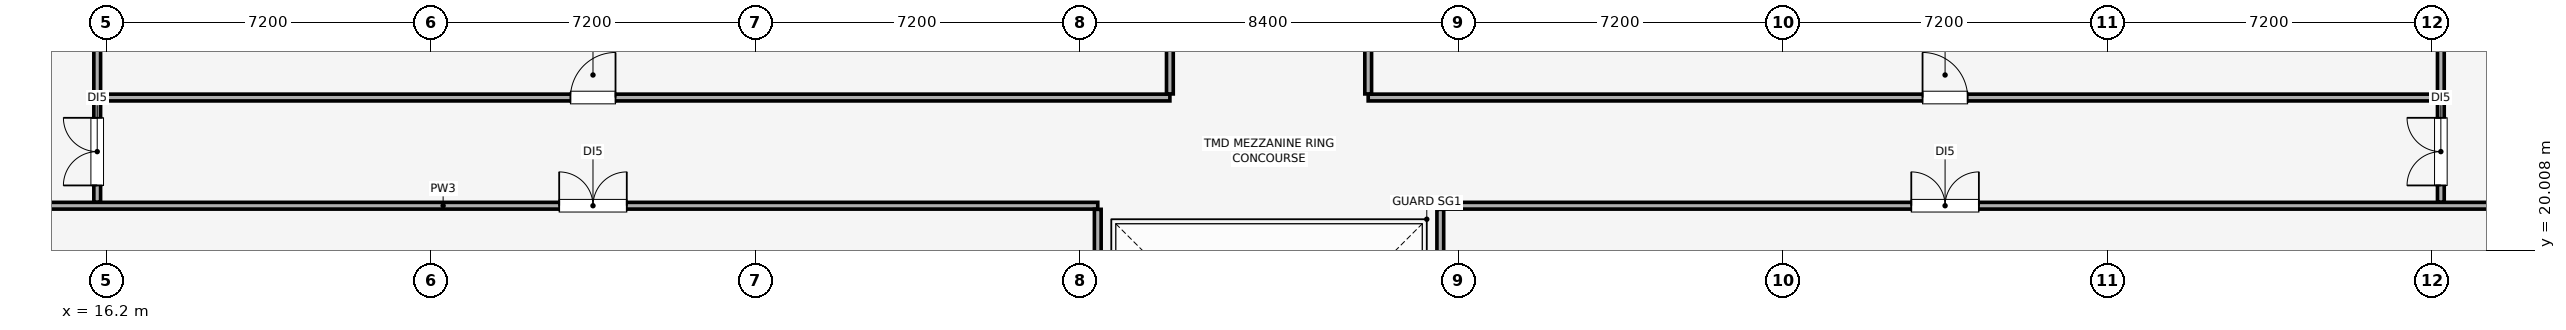
"""IFC4 building model, lengths in metres.
Left out: names, types, materials, properties, quantities, classifications, styles, units other than length and angle.
Written with IfcOpenShell. Run it as: python <this file> out.ifc"""

import sys

from ifc_helpers import new_model, si_unit, direction, frame, frame_2d, origin, place, context, subcontext, project, spatial, rectangle, extrude, element, fill, save


model = new_model("IFC4")
c1 = context("Model", 3, precision=1e-05, world=origin(), true_north=direction((0.0, 1.0)))
c2 = subcontext(c1, "Body", "Model", "MODEL_VIEW")
j1 = project(units=[si_unit("LENGTHUNIT", "METRE"), si_unit("PLANEANGLEUNIT", "RADIAN")], contexts=[c1])
p1 = place(None, origin())
s1 = spatial("IfcSite", under=j1, at=p1, CompositionType="ELEMENT")
p2 = place(p1, origin())
s2 = spatial("IfcBuilding", under=s1, at=p2, CompositionType="ELEMENT")
p3 = place(p2, frame((0.0, 0.0, 300.2)))
s3 = spatial("IfcBuildingStorey", under=s2, at=p3, CompositionType="ELEMENT", Elevation=300.2)
p4 = place(p3, frame((9.15, 21.0, 0.0), z_axis=(0.0, 0.0, 1.0), x_axis=(1.0, 0.0, 0.0)))
e1 = element("IfcWall", 1, at=p4, inside=s3, PredefinedType="PARTITIONING", context=c2, shape_type="SweptSolid", body=[
    extrude(rectangle(XDim=29.05, YDim=0.15, at=frame_2d((14.525, 0.0))), origin(), (0.0, 0.0, 1.0), 5.12),
])
p5 = place(p4, frame((17.1, 0.0, 0.0)))
e2 = element("IfcOpeningElement", 2, at=p5, cuts=e1, PredefinedType="OPENING", context=c2, shape_type="SweptSolid", body=[
    extrude(rectangle(XDim=1.5, YDim=2.25, at=frame_2d((0.75, 1.125))), frame((0.0, 0.085, 0.0), z_axis=(0.0, -1.0, 0.0), x_axis=(1.0, 0.0, 0.0)), (0.0, 0.0, 1.0), 0.17),
])
p6 = place(p3, frame((38.2, 7.15, 0.0), z_axis=(0.0, 0.0, 1.0), x_axis=(0.0, 1.0, 0.0)))
e3 = element("IfcWall", 3, at=p6, inside=s3, PredefinedType="PARTITIONING", context=c2, shape_type="SweptSolid", body=[
    extrude(rectangle(XDim=13.77, YDim=0.15, at=frame_2d((6.885, 0.0))), origin(), (0.0, 0.0, 1.0), 5.12),
])
p7 = place(p3, frame((45.8, 21.0, 0.0), z_axis=(0.0, 0.0, 1.0), x_axis=(1.0, 0.0, 0.0)))
e4 = element("IfcWall", 4, at=p7, inside=s3, PredefinedType="PARTITIONING", context=c2, shape_type="SweptSolid", body=[
    extrude(rectangle(XDim=29.05, YDim=0.15, at=frame_2d((14.525, 0.0))), origin(), (0.0, 0.0, 1.0), 5.12),
])
p8 = place(p7, frame((10.45, 0.0, 0.0)))
e5 = element("IfcOpeningElement", 5, at=p8, cuts=e4, PredefinedType="OPENING", context=c2, shape_type="SweptSolid", body=[
    extrude(rectangle(XDim=1.5, YDim=2.25, at=frame_2d((0.75, 1.125))), frame((0.0, 0.085, 0.0), z_axis=(0.0, -1.0, 0.0), x_axis=(1.0, 0.0, 0.0)), (0.0, 0.0, 1.0), 0.17),
])
p9 = place(p3, frame((45.8, 7.15, 0.0), z_axis=(0.0, 0.0, 1.0), x_axis=(0.0, 1.0, 0.0)))
e6 = element("IfcWall", 6, at=p9, inside=s3, PredefinedType="PARTITIONING", context=c2, shape_type="SweptSolid", body=[
    extrude(rectangle(XDim=13.77, YDim=0.15, at=frame_2d((6.885, 0.0))), origin(), (0.0, 0.0, 1.0), 5.12),
])
p10 = place(p3, frame((16.0, 23.4, 0.0), z_axis=(0.0, 0.0, 1.0), x_axis=(1.0, 0.0, 0.0)))
e7 = element("IfcWall", 7, at=p10, inside=s3, PredefinedType="PARTITIONING", context=c2, shape_type="SweptSolid", body=[
    extrude(rectangle(XDim=23.8, YDim=0.15, at=frame_2d((11.9, 0.0))), origin(), (0.0, 0.0, 1.0), 5.12),
])
p11 = place(p10, frame((10.5, 0.0, 0.0)))
e8 = element("IfcOpeningElement", 8, at=p11, cuts=e7, PredefinedType="OPENING", context=c2, shape_type="SweptSolid", body=[
    extrude(rectangle(XDim=1.0, YDim=2.15, at=frame_2d((0.5, 1.075))), frame((0.0, 0.085, 0.0), z_axis=(0.0, -1.0, 0.0), x_axis=(1.0, 0.0, 0.0)), (0.0, 0.0, 1.0), 0.17),
])
p12 = place(p3, frame((16.0, 23.48, 0.0), z_axis=(0.0, 0.0, 1.0), x_axis=(0.0, 1.0, 0.0)))
e9 = element("IfcWall", 9, at=p12, inside=s3, PredefinedType="PARTITIONING", context=c2, shape_type="SweptSolid", body=[
    extrude(rectangle(XDim=5.91, YDim=0.15, at=frame_2d((2.955, 0.0))), origin(), (0.0, 0.0, 1.0), 4.76),
])
p13 = place(p3, frame((39.8, 23.48, 0.0), z_axis=(0.0, 0.0, 1.0), x_axis=(0.0, 1.0, 0.0)))
e10 = element("IfcWall", 10, at=p13, inside=s3, PredefinedType="PARTITIONING", context=c2, shape_type="SweptSolid", body=[
    extrude(rectangle(XDim=5.84, YDim=0.15, at=frame_2d((2.92, 0.0))), origin(), (0.0, 0.0, 1.0), 5.12),
])
p14 = place(p3, frame((44.2, 23.4, 0.0), z_axis=(0.0, 0.0, 1.0), x_axis=(1.0, 0.0, 0.0)))
e11 = element("IfcWall", 11, at=p14, inside=s3, PredefinedType="PARTITIONING", context=c2, shape_type="SweptSolid", body=[
    extrude(rectangle(XDim=23.8, YDim=0.15, at=frame_2d((11.9, 0.0))), origin(), (0.0, 0.0, 1.0), 5.12),
])
p15 = place(p14, frame((12.3, 0.0, 0.0)))
e12 = element("IfcOpeningElement", 12, at=p15, cuts=e11, PredefinedType="OPENING", context=c2, shape_type="SweptSolid", body=[
    extrude(rectangle(XDim=1.0, YDim=2.15, at=frame_2d((0.5, 1.075))), frame((0.0, 0.085, 0.0), z_axis=(0.0, -1.0, 0.0), x_axis=(1.0, 0.0, 0.0)), (0.0, 0.0, 1.0), 0.17),
])
p16 = place(p3, frame((44.2, 23.48, 0.0), z_axis=(0.0, 0.0, 1.0), x_axis=(0.0, 1.0, 0.0)))
e13 = element("IfcWall", 13, at=p16, inside=s3, PredefinedType="PARTITIONING", context=c2, shape_type="SweptSolid", body=[
    extrude(rectangle(XDim=5.84, YDim=0.15, at=frame_2d((2.92, 0.0))), origin(), (0.0, 0.0, 1.0), 5.12),
])
p17 = place(p3, frame((68.0, 23.48, 0.0), z_axis=(0.0, 0.0, 1.0), x_axis=(0.0, 1.0, 0.0)))
e14 = element("IfcWall", 14, at=p17, inside=s3, PredefinedType="PARTITIONING", context=c2, shape_type="SweptSolid", body=[
    extrude(rectangle(XDim=5.91, YDim=0.15, at=frame_2d((2.955, 0.0))), origin(), (0.0, 0.0, 1.0), 4.76),
])
p18 = place(p3, frame((16.0, 21.08, 0.0), z_axis=(0.0, 0.0, 1.0), x_axis=(0.0, 1.0, 0.0)))
e15 = element("IfcWall", 15, at=p18, inside=s3, PredefinedType="PARTITIONING", context=c2, shape_type="SweptSolid", body=[
    extrude(rectangle(XDim=2.24, YDim=0.15, at=frame_2d((1.12, 0.0))), origin(), (0.0, 0.0, 1.0), 4.76),
])
p19 = place(p18, frame((0.37, 0.0, 0.0)))
e16 = element("IfcOpeningElement", 16, at=p19, cuts=e15, PredefinedType="OPENING", context=c2, shape_type="SweptSolid", body=[
    extrude(rectangle(XDim=1.5, YDim=2.25, at=frame_2d((0.75, 1.125))), frame((0.0, 0.085, 0.0), z_axis=(0.0, -1.0, 0.0), x_axis=(1.0, 0.0, 0.0)), (0.0, 0.0, 1.0), 0.17),
])
p20 = place(p3, frame((68.0, 21.08, 0.0), z_axis=(0.0, 0.0, 1.0), x_axis=(0.0, 1.0, 0.0)))
e17 = element("IfcWall", 17, at=p20, inside=s3, PredefinedType="PARTITIONING", context=c2, shape_type="SweptSolid", body=[
    extrude(rectangle(XDim=2.24, YDim=0.15, at=frame_2d((1.12, 0.0))), origin(), (0.0, 0.0, 1.0), 4.76),
])
p21 = place(p20, frame((0.37, 0.0, 0.0)))
e18 = element("IfcOpeningElement", 18, at=p21, cuts=e17, PredefinedType="OPENING", context=c2, shape_type="SweptSolid", body=[
    extrude(rectangle(XDim=1.5, YDim=2.25, at=frame_2d((0.75, 1.125))), frame((0.0, 0.085, 0.0), z_axis=(0.0, -1.0, 0.0), x_axis=(1.0, 0.0, 0.0)), (0.0, 0.0, 1.0), 0.17),
])
p22 = place(p5, origin())
e19 = element("IfcDoor", 19, at=p22, inside=s3, OperationType="DOUBLE_DOOR_SINGLE_SWING", PredefinedType="DOOR", context=c2, shape_type="SweptSolid", body=[
    extrude(rectangle(XDim=1.5, YDim=2.25, at=frame_2d((0.75, 1.125))), frame((0.0, 0.025, 0.0), z_axis=(0.0, -1.0, 0.0), x_axis=(1.0, 0.0, 0.0)), (0.0, 0.0, 1.0), 0.05),
])
fill(e2, e19)
p23 = place(p8, origin())
e20 = element("IfcDoor", 20, at=p23, inside=s3, OperationType="DOUBLE_DOOR_SINGLE_SWING", PredefinedType="DOOR", context=c2, shape_type="SweptSolid", body=[
    extrude(rectangle(XDim=1.5, YDim=2.25, at=frame_2d((0.75, 1.125))), frame((0.0, 0.025, 0.0), z_axis=(0.0, -1.0, 0.0), x_axis=(1.0, 0.0, 0.0)), (0.0, 0.0, 1.0), 0.05),
])
fill(e5, e20)
p24 = place(p11, origin())
e21 = element("IfcDoor", 21, at=p24, inside=s3, OperationType="SINGLE_SWING_RIGHT", PredefinedType="DOOR", context=c2, shape_type="SweptSolid", body=[
    extrude(rectangle(XDim=1.0, YDim=2.15, at=frame_2d((0.5, 1.075))), frame((0.0, 0.025, 0.0), z_axis=(0.0, -1.0, 0.0), x_axis=(1.0, 0.0, 0.0)), (0.0, 0.0, 1.0), 0.05),
])
fill(e8, e21)
p25 = place(p15, origin())
e22 = element("IfcDoor", 22, at=p25, inside=s3, OperationType="SINGLE_SWING_LEFT", PredefinedType="DOOR", context=c2, shape_type="SweptSolid", body=[
    extrude(rectangle(XDim=1.0, YDim=2.15, at=frame_2d((0.5, 1.075))), frame((0.0, 0.025, 0.0), z_axis=(0.0, -1.0, 0.0), x_axis=(1.0, 0.0, 0.0)), (0.0, 0.0, 1.0), 0.05),
])
fill(e12, e22)
p26 = place(p19, origin())
e23 = element("IfcDoor", 23, at=p26, inside=s3, OperationType="DOUBLE_DOOR_SINGLE_SWING", PredefinedType="DOOR", context=c2, shape_type="SweptSolid", body=[
    extrude(rectangle(XDim=1.5, YDim=2.25, at=frame_2d((0.75, 1.125))), frame((0.0, 0.025, 0.0), z_axis=(0.0, -1.0, 0.0), x_axis=(1.0, 0.0, 0.0)), (0.0, 0.0, 1.0), 0.05),
])
fill(e16, e23)
p27 = place(p21, origin())
e24 = element("IfcDoor", 24, at=p27, inside=s3, OperationType="DOUBLE_DOOR_SINGLE_SWING", PredefinedType="DOOR", context=c2, shape_type="SweptSolid", body=[
    extrude(rectangle(XDim=1.5, YDim=2.25, at=frame_2d((0.75, 1.125))), frame((0.0, 0.025, 0.0), z_axis=(0.0, -1.0, 0.0), x_axis=(1.0, 0.0, 0.0)), (0.0, 0.0, 1.0), 0.05),
])
fill(e18, e24)
save(model, sys.argv[1])
